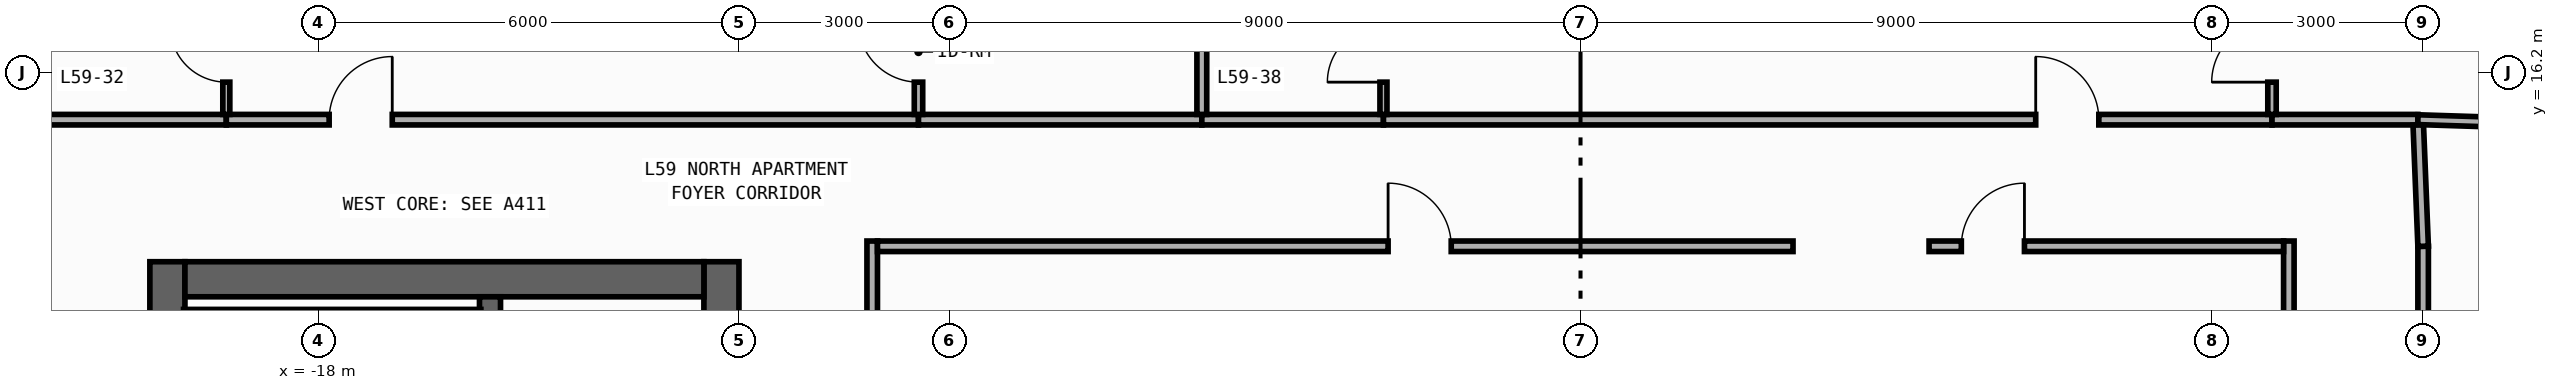
"""IFC4 building model, lengths in metres.
Left out: names, types, materials, properties, quantities, classifications, styles, units other than length and angle.
Written with IfcOpenShell. Run it as: python <this file> out.ifc"""

import sys

from ifc_helpers import new_model, si_unit, direction, frame, frame_2d, origin, place, context, subcontext, project, spatial, rectangle, extrude, element, fill, save


model = new_model("IFC4")
c1 = context("Model", 3, precision=1e-05, world=origin(), true_north=direction((0.0, 1.0)))
c2 = subcontext(c1, "Body", "Model", "MODEL_VIEW")
j1 = project(units=[si_unit("LENGTHUNIT", "METRE"), si_unit("PLANEANGLEUNIT", "RADIAN")], contexts=[c1])
p1 = place(None, origin())
s1 = spatial("IfcSite", under=j1, at=p1, CompositionType="ELEMENT")
p2 = place(p1, origin())
s2 = spatial("IfcBuilding", under=s1, at=p2, CompositionType="ELEMENT")
p3 = place(p2, frame((0.0, 0.0, 251.2)))
s3 = spatial("IfcBuildingStorey", under=s2, at=p3, CompositionType="ELEMENT", Elevation=251.2)
p4 = place(p3, frame((-20.15, -13.5, 0.0), z_axis=(0.0, 0.0, 1.0), x_axis=(0.0, 1.0, 0.0)))
e1 = element("IfcWall", 1, at=p4, inside=s3, PredefinedType="SHEAR", context=c2, shape_type="SweptSolid", body=[
    extrude(rectangle(XDim=27.0, YDim=0.5, at=frame_2d((13.5, 0.0))), origin(), (0.0, 0.0, 1.0), 3.34),
])
p5 = place(p3, frame((-12.25, -13.5, 0.0), z_axis=(0.0, 0.0, 1.0), x_axis=(0.0, 1.0, 0.0)))
e2 = element("IfcWall", 2, at=p5, inside=s3, PredefinedType="SHEAR", context=c2, shape_type="SweptSolid", body=[
    extrude(rectangle(XDim=27.0, YDim=0.5, at=frame_2d((13.5, 0.0))), origin(), (0.0, 0.0, 1.0), 3.34),
])
p6 = place(p5, frame((15.175, 0.0, 0.0)))
e3 = element("IfcOpeningElement", 3, at=p6, cuts=e2, PredefinedType="OPENING", context=c2, shape_type="SweptSolid", body=[
    extrude(rectangle(XDim=0.85, YDim=2.1, at=frame_2d((0.425, 1.05))), frame((0.0, 0.26, 0.0), z_axis=(0.0, -1.0, 0.0), x_axis=(1.0, 0.0, 0.0)), (0.0, 0.0, 1.0), 0.52),
])
p7 = place(p5, frame((21.275, 0.0, 0.0)))
e4 = element("IfcOpeningElement", 4, at=p7, cuts=e2, PredefinedType="OPENING", context=c2, shape_type="SweptSolid", body=[
    extrude(rectangle(XDim=0.85, YDim=2.1, at=frame_2d((0.425, 1.05))), frame((0.0, 0.26, 0.0), z_axis=(0.0, -1.0, 0.0), x_axis=(1.0, 0.0, 0.0)), (0.0, 0.0, 1.0), 0.52),
])
p8 = place(p5, frame((4.275, 0.0, 0.0)))
e5 = element("IfcOpeningElement", 5, at=p8, cuts=e2, PredefinedType="OPENING", context=c2, shape_type="SweptSolid", body=[
    extrude(rectangle(XDim=0.85, YDim=2.1, at=frame_2d((0.425, 1.05))), frame((0.0, 0.26, 0.0), z_axis=(0.0, -1.0, 0.0), x_axis=(1.0, 0.0, 0.0)), (0.0, 0.0, 1.0), 0.52),
])
p9 = place(p5, frame((10.275, 0.0, 0.0)))
e6 = element("IfcOpeningElement", 6, at=p9, cuts=e2, PredefinedType="OPENING", context=c2, shape_type="SweptSolid", body=[
    extrude(rectangle(XDim=0.85, YDim=2.1, at=frame_2d((0.425, 1.05))), frame((0.0, 0.26, 0.0), z_axis=(0.0, -1.0, 0.0), x_axis=(1.0, 0.0, 0.0)), (0.0, 0.0, 1.0), 0.52),
])
p10 = place(p5, frame((12.725, 0.0, 0.0)))
e7 = element("IfcOpeningElement", 7, at=p10, cuts=e2, PredefinedType="OPENING", context=c2, shape_type="SweptSolid", body=[
    extrude(rectangle(XDim=1.15, YDim=2.2, at=frame_2d((0.575, 1.1))), frame((0.0, 0.26, 0.0), z_axis=(0.0, -1.0, 0.0), x_axis=(1.0, 0.0, 0.0)), (0.0, 0.0, 1.0), 0.52),
])
p11 = place(p5, frame((1.625, 0.0, 0.0)))
e8 = element("IfcOpeningElement", 8, at=p11, cuts=e2, PredefinedType="OPENING", context=c2, shape_type="SweptSolid", body=[
    extrude(rectangle(XDim=0.85, YDim=2.1, at=frame_2d((0.425, 1.05))), frame((0.0, 0.26, 0.0), z_axis=(0.0, -1.0, 0.0), x_axis=(1.0, 0.0, 0.0)), (0.0, 0.0, 1.0), 0.52),
])
p12 = place(p3, frame((-19.9, 13.25, 0.0), z_axis=(0.0, 0.0, 1.0), x_axis=(1.0, 0.0, 0.0)))
e9 = element("IfcWall", 9, at=p12, inside=s3, PredefinedType="SHEAR", context=c2, shape_type="SweptSolid", body=[
    extrude(rectangle(XDim=7.4, YDim=0.5, at=frame_2d((3.7, 0.0))), origin(), (0.0, 0.0, 1.0), 3.34),
])
p13 = place(p3, frame((-15.55, -13.0, 0.0), z_axis=(0.0, 0.0, 1.0), x_axis=(0.0, 1.0, 0.0)))
e10 = element("IfcWall", 10, at=p13, inside=s3, PredefinedType="SHEAR", context=c2, shape_type="SweptSolid", body=[
    extrude(rectangle(XDim=26.0, YDim=0.3, at=frame_2d((13.0, 0.0))), origin(), (0.0, 0.0, 1.0), 3.34),
])
p14 = place(p13, frame((12.225, 0.0, 0.0)))
e11 = element("IfcOpeningElement", 11, at=p14, cuts=e10, PredefinedType="OPENING", context=c2, shape_type="SweptSolid", body=[
    extrude(rectangle(XDim=1.15, YDim=2.2, at=frame_2d((0.575, 1.1))), frame((0.0, 0.16, 0.0), z_axis=(0.0, -1.0, 0.0), x_axis=(1.0, 0.0, 0.0)), (0.0, 0.0, 1.0), 0.32),
])
p15 = place(p13, frame((1.125, 0.0, 0.0)))
e12 = element("IfcOpeningElement", 12, at=p15, cuts=e10, PredefinedType="OPENING", context=c2, shape_type="SweptSolid", body=[
    extrude(rectangle(XDim=0.85, YDim=2.1, at=frame_2d((0.425, 1.05))), frame((0.0, 0.16, 0.0), z_axis=(0.0, -1.0, 0.0), x_axis=(1.0, 0.0, 0.0)), (0.0, 0.0, 1.0), 0.32),
])
p16 = place(p3, frame((-19.92, 12.71, 0.0), z_axis=(0.0, 0.0, 1.0), x_axis=(1.0, 0.0, 0.0)))
e13 = element("IfcWall", 13, at=p16, inside=s3, PredefinedType="SHEAR", context=c2, shape_type="SweptSolid", body=[
    extrude(rectangle(XDim=4.24, YDim=0.22, at=frame_2d((2.12, 0.0))), origin(), (0.0, 0.0, 1.0), 3.34),
])
p17 = place(p3, frame((-10.1, 4.79, 0.0), z_axis=(0.0, 0.0, 1.0), x_axis=(0.0, 1.0, 0.0)))
e14 = element("IfcWall", 14, at=p17, inside=s3, PredefinedType="PARTITIONING", context=c2, shape_type="SweptSolid", body=[
    extrude(rectangle(XDim=9.005, YDim=0.15, at=frame_2d((4.502, 0.0))), origin(), (0.0, 0.0, 1.0), 3.34),
])
p18 = place(p17, frame((0.46, 0.0, 0.0)))
e15 = element("IfcOpeningElement", 15, at=p18, cuts=e14, PredefinedType="OPENING", context=c2, shape_type="SweptSolid", body=[
    extrude(rectangle(XDim=0.9, YDim=2.15, at=frame_2d((0.45, 1.075))), frame((0.0, 0.085, 0.0), z_axis=(0.0, -1.0, 0.0), x_axis=(1.0, 0.0, 0.0)), (0.0, 0.0, 1.0), 0.17),
])
p19 = place(p3, frame((12.015, 7.2, 0.0), z_axis=(0.0, 0.0, 1.0), x_axis=(0.0, 1.0, 0.0)))
e16 = element("IfcWall", 16, at=p19, inside=s3, PredefinedType="PARTITIONING", context=c2, shape_type="SweptSolid", body=[
    extrude(rectangle(XDim=6.52, YDim=0.15, at=frame_2d((3.26, 0.0))), origin(), (0.0, 0.0, 1.0), 3.34),
])
p20 = place(p19, frame((0.67, 0.0, 0.0)))
e17 = element("IfcOpeningElement", 17, at=p20, cuts=e16, PredefinedType="OPENING", context=c2, shape_type="SweptSolid", body=[
    extrude(rectangle(XDim=0.9, YDim=2.15, at=frame_2d((0.45, 1.075))), frame((0.0, 0.085, 0.0), z_axis=(0.0, -1.0, 0.0), x_axis=(1.0, 0.0, 0.0)), (0.0, 0.0, 1.0), 0.17),
])
p21 = place(p3, frame((10.1, 4.79, 0.0), z_axis=(0.0, 0.0, 1.0), x_axis=(0.0, 1.0, 0.0)))
e18 = element("IfcWall", 18, at=p21, inside=s3, PredefinedType="PARTITIONING", context=c2, shape_type="SweptSolid", body=[
    extrude(rectangle(XDim=9.005, YDim=0.15, at=frame_2d((4.502, 0.0))), origin(), (0.0, 0.0, 1.0), 3.34),
])
p22 = place(p21, frame((0.46, 0.0, 0.0)))
e19 = element("IfcOpeningElement", 19, at=p22, cuts=e18, PredefinedType="OPENING", context=c2, shape_type="SweptSolid", body=[
    extrude(rectangle(XDim=0.9, YDim=2.15, at=frame_2d((0.45, 1.075))), frame((0.0, 0.085, 0.0), z_axis=(0.0, -1.0, 0.0), x_axis=(1.0, 0.0, 0.0)), (0.0, 0.0, 1.0), 0.17),
])
p23 = place(p3, frame((-21.955, 15.525, 0.0), z_axis=(0.0, 0.0, 1.0), x_axis=(1.0, 0.0, 0.0)))
e20 = element("IfcWall", 20, at=p23, inside=s3, PredefinedType="PARTITIONING", context=c2, shape_type="SweptSolid", body=[
    extrude(rectangle(XDim=2.645, YDim=0.15, at=frame_2d((1.323, 0.0))), origin(), (0.0, 0.0, 1.0), 3.34),
])
p24 = place(p3, frame((-19.31, 15.525, 0.0), z_axis=(0.0, 0.0, 1.0), x_axis=(1.0, 0.0, 0.0)))
e21 = element("IfcWall", 21, at=p24, inside=s3, PredefinedType="PARTITIONING", context=c2, shape_type="SweptSolid", body=[
    extrude(rectangle(XDim=9.87, YDim=0.15, at=frame_2d((4.935, 0.0))), origin(), (0.0, 0.0, 1.0), 3.34),
])
p25 = place(p24, frame((1.466, 0.0, 0.0)))
e22 = element("IfcOpeningElement", 22, at=p25, cuts=e21, PredefinedType="OPENING", context=c2, shape_type="SweptSolid", body=[
    extrude(rectangle(XDim=0.9, YDim=2.15, at=frame_2d((0.45, 1.075))), frame((0.0, 0.085, 0.0), z_axis=(0.0, -1.0, 0.0), x_axis=(1.0, 0.0, 0.0)), (0.0, 0.0, 1.0), 0.17),
])
p26 = place(p3, frame((-9.44, 15.525, 0.0), z_axis=(0.0, 0.0, 1.0), x_axis=(1.0, 0.0, 0.0)))
e23 = element("IfcWall", 23, at=p26, inside=s3, PredefinedType="PARTITIONING", context=c2, shape_type="SweptSolid", body=[
    extrude(rectangle(XDim=4.04, YDim=0.15, at=frame_2d((2.02, 0.0))), origin(), (0.0, 0.0, 1.0), 3.34),
])
p27 = place(p3, frame((-5.4, 15.525, 0.0), z_axis=(0.0, 0.0, 1.0), x_axis=(1.0, 0.0, 0.0)))
e24 = element("IfcWall", 24, at=p27, inside=s3, PredefinedType="PARTITIONING", context=c2, shape_type="SweptSolid", body=[
    extrude(rectangle(XDim=2.59, YDim=0.15, at=frame_2d((1.295, 0.0))), origin(), (0.0, 0.0, 1.0), 3.34),
])
p28 = place(p3, frame((-2.81, 15.525, 0.0), z_axis=(0.0, 0.0, 1.0), x_axis=(1.0, 0.0, 0.0)))
e25 = element("IfcWall", 25, at=p28, inside=s3, PredefinedType="PARTITIONING", context=c2, shape_type="SweptSolid", body=[
    extrude(rectangle(XDim=12.67, YDim=0.15, at=frame_2d((6.335, 0.0))), origin(), (0.0, 0.0, 1.0), 3.34),
])
p29 = place(p28, frame((9.301, 0.0, 0.0)))
e26 = element("IfcOpeningElement", 26, at=p29, cuts=e25, PredefinedType="OPENING", context=c2, shape_type="SweptSolid", body=[
    extrude(rectangle(XDim=0.9, YDim=2.15, at=frame_2d((0.45, 1.075))), frame((0.0, 0.085, 0.0), z_axis=(0.0, -1.0, 0.0), x_axis=(1.0, 0.0, 0.0)), (0.0, 0.0, 1.0), 0.17),
])
p30 = place(p3, frame((9.86, 15.525, 0.0), z_axis=(0.0, 0.0, 1.0), x_axis=(1.0, 0.0, 0.0)))
e27 = element("IfcWall", 27, at=p30, inside=s3, PredefinedType="PARTITIONING", context=c2, shape_type="SweptSolid", body=[
    extrude(rectangle(XDim=2.08, YDim=0.15, at=frame_2d((1.04, 0.0))), origin(), (0.0, 0.0, 1.0), 3.34),
])
p31 = place(p3, frame((12.015, 13.72, 0.0), z_axis=(0.0, 0.0, 1.0), x_axis=(-0.040046877756, 0.99919780203, 0.0)))
e28 = element("IfcWall", 28, at=p31, inside=s3, PredefinedType="PARTITIONING", context=c2, shape_type="SweptSolid", body=[
    extrude(rectangle(XDim=1.731, YDim=0.15, at=frame_2d((0.866, 0.0))), origin(), (0.0, 0.0, 1.0), 3.34),
])
p32 = place(p3, frame((-10.025, 13.72, 0.0), z_axis=(0.0, 0.0, 1.0), x_axis=(1.0, 0.0, 0.0)))
e29 = element("IfcWall", 29, at=p32, inside=s3, PredefinedType="PARTITIONING", context=c2, shape_type="SweptSolid", body=[
    extrude(rectangle(XDim=13.055, YDim=0.15, at=frame_2d((6.527, 0.0))), origin(), (0.0, 0.0, 1.0), 3.34),
])
p33 = place(p32, frame((7.281, 0.0, 0.0)))
e30 = element("IfcOpeningElement", 30, at=p33, cuts=e29, PredefinedType="OPENING", context=c2, shape_type="SweptSolid", body=[
    extrude(rectangle(XDim=0.9, YDim=2.15, at=frame_2d((0.45, 1.075))), frame((0.0, 0.085, 0.0), z_axis=(0.0, -1.0, 0.0), x_axis=(1.0, 0.0, 0.0)), (0.0, 0.0, 1.0), 0.17),
])
p34 = place(p3, frame((4.97, 13.72, 0.0), z_axis=(0.0, 0.0, 1.0), x_axis=(1.0, 0.0, 0.0)))
e31 = element("IfcWall", 31, at=p34, inside=s3, PredefinedType="PARTITIONING", context=c2, shape_type="SweptSolid", body=[
    extrude(rectangle(XDim=5.055, YDim=0.15, at=frame_2d((2.527, 0.0))), origin(), (0.0, 0.0, 1.0), 3.34),
])
p35 = place(p34, frame((0.46, 0.0, 0.0)))
e32 = element("IfcOpeningElement", 32, at=p35, cuts=e31, PredefinedType="OPENING", context=c2, shape_type="SweptSolid", body=[
    extrude(rectangle(XDim=0.9, YDim=2.15, at=frame_2d((0.45, 1.075))), frame((0.0, 0.085, 0.0), z_axis=(0.0, -1.0, 0.0), x_axis=(1.0, 0.0, 0.0)), (0.0, 0.0, 1.0), 0.17),
])
p36 = place(p3, frame((-19.31, 15.6, 0.0), z_axis=(0.0, 0.0, 1.0), x_axis=(0.0, 1.0, 0.0)))
e33 = element("IfcWall", 33, at=p36, inside=s3, PredefinedType="PARTITIONING", context=c2, shape_type="SweptSolid", body=[
    extrude(rectangle(XDim=2.5, YDim=0.1, at=frame_2d((1.25, 0.0))), origin(), (0.0, 0.0, 1.0), 3.34),
])
p37 = place(p36, frame((0.46, 0.0, 0.0)))
e34 = element("IfcOpeningElement", 34, at=p37, cuts=e33, PredefinedType="OPENING", context=c2, shape_type="SweptSolid", body=[
    extrude(rectangle(XDim=0.8, YDim=2.1, at=frame_2d((0.4, 1.05))), frame((0.0, 0.06, 0.0), z_axis=(0.0, -1.0, 0.0), x_axis=(1.0, 0.0, 0.0)), (0.0, 0.0, 1.0), 0.12),
])
p38 = place(p3, frame((-9.44, 15.6, 0.0), z_axis=(0.0, 0.0, 1.0), x_axis=(0.0, 1.0, 0.0)))
e35 = element("IfcWall", 35, at=p38, inside=s3, PredefinedType="PARTITIONING", context=c2, shape_type="SweptSolid", body=[
    extrude(rectangle(XDim=4.5, YDim=0.12, at=frame_2d((2.25, 0.0))), origin(), (0.0, 0.0, 1.0), 2.44),
])
p39 = place(p38, frame((0.46, 0.0, 0.0)))
e36 = element("IfcOpeningElement", 36, at=p39, cuts=e35, PredefinedType="OPENING", context=c2, shape_type="SweptSolid", body=[
    extrude(rectangle(XDim=0.86, YDim=2.15, at=frame_2d((0.43, 1.075))), frame((0.0, 0.07, 0.0), z_axis=(0.0, -1.0, 0.0), x_axis=(1.0, 0.0, 0.0)), (0.0, 0.0, 1.0), 0.14),
])
p40 = place(p3, frame((-5.4, 15.6, 0.0), z_axis=(0.0, 0.0, 1.0), x_axis=(0.0, 1.0, 0.0)))
e37 = element("IfcWall", 37, at=p40, inside=s3, PredefinedType="PARTITIONING", context=c2, shape_type="SweptSolid", body=[
    extrude(rectangle(XDim=2.5, YDim=0.14, at=frame_2d((1.25, 0.0))), origin(), (0.0, 0.0, 1.0), 3.34),
])
p41 = place(p3, frame((-2.81, 15.6, 0.0), z_axis=(0.0, 0.0, 1.0), x_axis=(0.0, 1.0, 0.0)))
e38 = element("IfcWall", 38, at=p41, inside=s3, PredefinedType="PARTITIONING", context=c2, shape_type="SweptSolid", body=[
    extrude(rectangle(XDim=2.5, YDim=0.1, at=frame_2d((1.25, 0.0))), origin(), (0.0, 0.0, 1.0), 3.34),
])
p42 = place(p41, frame((0.46, 0.0, 0.0)))
e39 = element("IfcOpeningElement", 39, at=p42, cuts=e38, PredefinedType="OPENING", context=c2, shape_type="SweptSolid", body=[
    extrude(rectangle(XDim=0.8, YDim=2.1, at=frame_2d((0.4, 1.05))), frame((0.0, 0.06, 0.0), z_axis=(0.0, -1.0, 0.0), x_axis=(1.0, 0.0, 0.0)), (0.0, 0.0, 1.0), 0.12),
])
p43 = place(p3, frame((9.86, 15.6, 0.0), z_axis=(0.0, 0.0, 1.0), x_axis=(0.0, 1.0, 0.0)))
e40 = element("IfcWall", 40, at=p43, inside=s3, PredefinedType="PARTITIONING", context=c2, shape_type="SweptSolid", body=[
    extrude(rectangle(XDim=4.5, YDim=0.12, at=frame_2d((2.25, 0.0))), origin(), (0.0, 0.0, 1.0), 3.34),
])
p44 = place(p43, frame((0.46, 0.0, 0.0)))
e41 = element("IfcOpeningElement", 41, at=p44, cuts=e40, PredefinedType="OPENING", context=c2, shape_type="SweptSolid", body=[
    extrude(rectangle(XDim=0.86, YDim=2.15, at=frame_2d((0.43, 1.075))), frame((0.0, 0.07, 0.0), z_axis=(0.0, -1.0, 0.0), x_axis=(1.0, 0.0, 0.0)), (0.0, 0.0, 1.0), 0.14),
])
p45 = place(p3, frame((11.94, 15.525, 0.0), z_axis=(0.0, 0.0, 1.0), x_axis=(0.999493701671, -0.031817295912, 0.0)))
e42 = element("IfcWall", 42, at=p45, inside=s3, PredefinedType="PARTITIONING", context=c2, shape_type="SweptSolid", body=[
    extrude(rectangle(XDim=2.041, YDim=0.14, at=frame_2d((1.021, 0.0))), origin(), (0.0, 0.0, 1.0), 3.34),
])
p46 = place(p25, origin())
e43 = element("IfcDoor", 43, at=p46, inside=s3, OperationType="SINGLE_SWING_RIGHT", PredefinedType="DOOR", context=c2, shape_type="SweptSolid", body=[
    extrude(rectangle(XDim=0.9, YDim=2.15, at=frame_2d((0.45, 1.075))), frame((0.0, 0.025, 0.0), z_axis=(0.0, -1.0, 0.0), x_axis=(1.0, 0.0, 0.0)), (0.0, 0.0, 1.0), 0.05),
])
fill(e22, e43)
p47 = place(p29, origin())
e44 = element("IfcDoor", 44, at=p47, inside=s3, OperationType="SINGLE_SWING_LEFT", PredefinedType="DOOR", context=c2, shape_type="SweptSolid", body=[
    extrude(rectangle(XDim=0.9, YDim=2.15, at=frame_2d((0.45, 1.075))), frame((0.0, 0.025, 0.0), z_axis=(0.0, -1.0, 0.0), x_axis=(1.0, 0.0, 0.0)), (0.0, 0.0, 1.0), 0.05),
])
fill(e26, e44)
p48 = place(p33, origin())
e45 = element("IfcDoor", 45, at=p48, inside=s3, OperationType="SINGLE_SWING_LEFT", PredefinedType="DOOR", context=c2, shape_type="SweptSolid", body=[
    extrude(rectangle(XDim=0.9, YDim=2.15, at=frame_2d((0.45, 1.075))), frame((0.0, 0.025, 0.0), z_axis=(0.0, -1.0, 0.0), x_axis=(1.0, 0.0, 0.0)), (0.0, 0.0, 1.0), 0.05),
])
fill(e30, e45)
p49 = place(p35, origin())
e46 = element("IfcDoor", 46, at=p49, inside=s3, OperationType="SINGLE_SWING_RIGHT", PredefinedType="DOOR", context=c2, shape_type="SweptSolid", body=[
    extrude(rectangle(XDim=0.9, YDim=2.15, at=frame_2d((0.45, 1.075))), frame((0.0, 0.025, 0.0), z_axis=(0.0, -1.0, 0.0), x_axis=(1.0, 0.0, 0.0)), (0.0, 0.0, 1.0), 0.05),
])
fill(e32, e46)
p50 = place(p37, origin())
e47 = element("IfcDoor", 47, at=p50, inside=s3, OperationType="SINGLE_SWING_RIGHT", PredefinedType="DOOR", context=c2, shape_type="SweptSolid", body=[
    extrude(rectangle(XDim=0.8, YDim=2.1, at=frame_2d((0.4, 1.05))), frame((0.0, 0.025, 0.0), z_axis=(0.0, -1.0, 0.0), x_axis=(1.0, 0.0, 0.0)), (0.0, 0.0, 1.0), 0.05),
])
fill(e34, e47)
p51 = place(p39, origin())
e48 = element("IfcDoor", 48, at=p51, inside=s3, OperationType="SINGLE_SWING_RIGHT", PredefinedType="DOOR", context=c2, shape_type="SweptSolid", body=[
    extrude(rectangle(XDim=0.86, YDim=2.15, at=frame_2d((0.43, 1.075))), frame((0.0, 0.025, 0.0), z_axis=(0.0, -1.0, 0.0), x_axis=(1.0, 0.0, 0.0)), (0.0, 0.0, 1.0), 0.05),
])
fill(e36, e48)
p52 = place(p42, origin())
e49 = element("IfcDoor", 49, at=p52, inside=s3, OperationType="SINGLE_SWING_LEFT", PredefinedType="DOOR", context=c2, shape_type="SweptSolid", body=[
    extrude(rectangle(XDim=0.8, YDim=2.1, at=frame_2d((0.4, 1.05))), frame((0.0, 0.025, 0.0), z_axis=(0.0, -1.0, 0.0), x_axis=(1.0, 0.0, 0.0)), (0.0, 0.0, 1.0), 0.05),
])
fill(e39, e49)
p53 = place(p44, origin())
e50 = element("IfcDoor", 50, at=p53, inside=s3, OperationType="SINGLE_SWING_LEFT", PredefinedType="DOOR", context=c2, shape_type="SweptSolid", body=[
    extrude(rectangle(XDim=0.86, YDim=2.15, at=frame_2d((0.43, 1.075))), frame((0.0, 0.025, 0.0), z_axis=(0.0, -1.0, 0.0), x_axis=(1.0, 0.0, 0.0)), (0.0, 0.0, 1.0), 0.05),
])
fill(e41, e50)
save(model, sys.argv[1])
